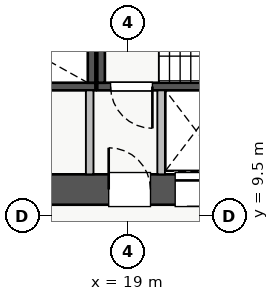
"""IFC4 building model, lengths in metres.
Left out: names, types, materials, properties, quantities, classifications, styles, units other than length and angle.
Written with IfcOpenShell. Run it as: python <this file> out.ifc"""

import sys

from ifc_helpers import new_model, si_unit, direction, frame, frame_2d, origin, place, context, subcontext, project, spatial, rectangle, extrude, source, transform, mapped, element, fill, save


model = new_model("IFC4")
c1 = context("Model", 3, precision=1e-05, world=origin(), true_north=direction((0.0, 1.0)))
c2 = subcontext(c1, "Body", "Model", "MODEL_VIEW")
j1 = project(units=[si_unit("LENGTHUNIT", "METRE"), si_unit("PLANEANGLEUNIT", "RADIAN")], contexts=[c1])
p1 = place(None, origin())
s1 = spatial("IfcSite", under=j1, at=p1, CompositionType="ELEMENT")
p2 = place(p1, origin())
s2 = spatial("IfcBuilding", under=s1, at=p2, CompositionType="ELEMENT")
p3 = place(p2, frame((0.0, 0.0, 82.75)))
s3 = spatial("IfcBuildingStorey", under=s2, at=p3, CompositionType="ELEMENT", Elevation=82.75)
p4 = place(p3, frame((19.88, 12.8, 0.0), z_axis=(0.0, 0.0, 1.0), x_axis=(1.0, 0.0, 0.0)))
e1 = element("IfcWall", 1, at=p4, inside=s3, PredefinedType="SHEAR", context=c2, shape_type="SweptSolid", body=[
    extrude(rectangle(XDim=1.87, YDim=0.18, at=frame_2d((0.935, 0.0))), origin(), (0.0, 0.0, 1.0), 3.07),
])
p5 = place(p3, frame((11.0, 12.91, 0.0), z_axis=(0.0, 0.0, 1.0), x_axis=(1.0, 0.0, 0.0)))
e2 = element("IfcWall", 2, at=p5, inside=s3, PredefinedType="SHEAR", context=c2, shape_type="SweptSolid", body=[
    extrude(rectangle(XDim=7.15, YDim=0.2, at=frame_2d((3.575, 0.0))), origin(), (0.0, 0.0, 1.0), 3.25),
])
p6 = place(p5, frame((0.35, 0.0, 0.0)))
e3 = element("IfcOpeningElement", 3, at=p6, cuts=e2, PredefinedType="OPENING", context=c2, shape_type="SweptSolid", body=[
    extrude(rectangle(XDim=1.1, YDim=2.05, at=frame_2d((0.55, 1.025))), frame((0.0, 0.11, 0.0), z_axis=(0.0, -1.0, 0.0), x_axis=(1.0, 0.0, 0.0)), (0.0, 0.0, 1.0), 0.22),
])
p7 = place(p3, frame((18.05, 13.01, 0.0), z_axis=(0.0, 0.0, 1.0), x_axis=(0.0, 1.0, 0.0)))
e4 = element("IfcWall", 4, at=p7, inside=s3, PredefinedType="SHEAR", context=c2, shape_type="SweptSolid", body=[
    extrude(rectangle(XDim=2.94, YDim=0.2, at=frame_2d((1.47, 0.0))), origin(), (0.0, 0.0, 1.0), 3.25),
])
p8 = place(p3, frame((18.2, 12.91, 0.0), z_axis=(0.0, 0.0, 1.0), x_axis=(1.0, 0.0, 0.0)))
e5 = element("IfcWall", 5, at=p8, inside=s3, PredefinedType="SHEAR", context=c2, shape_type="SweptSolid", body=[
    extrude(rectangle(XDim=7.15, YDim=0.2, at=frame_2d((3.575, 0.0))), origin(), (0.0, 0.0, 1.0), 3.25),
])
p9 = place(p8, frame((0.35, 0.0, 0.0)))
e6 = element("IfcOpeningElement", 6, at=p9, cuts=e5, PredefinedType="OPENING", context=c2, shape_type="SweptSolid", body=[
    extrude(rectangle(XDim=1.1, YDim=2.05, at=frame_2d((0.55, 1.025))), frame((0.0, 0.11, 0.0), z_axis=(0.0, -1.0, 0.0), x_axis=(1.0, 0.0, 0.0)), (0.0, 0.0, 1.0), 0.22),
])
p10 = place(p3, frame((18.3, 13.01, 0.0), z_axis=(0.0, 0.0, 1.0), x_axis=(0.0, 1.0, 0.0)))
e7 = element("IfcWall", 7, at=p10, inside=s3, PredefinedType="SHEAR", context=c2, shape_type="SweptSolid", body=[
    extrude(rectangle(XDim=2.94, YDim=0.2, at=frame_2d((1.47, 0.0))), origin(), (0.0, 0.0, 1.0), 3.25),
])
p11 = place(p3, frame((10.2, 10.2, 0.0), z_axis=(0.0, 0.0, 1.0), x_axis=(1.0, 0.0, 0.0)))
e8 = element("IfcWall", 8, at=p11, inside=s3, PredefinedType="SHEAR", context=c2, shape_type="SweptSolid", body=[
    extrude(rectangle(XDim=17.6, YDim=0.8, at=frame_2d((8.8, 0.0))), origin(), (0.0, 0.0, 1.0), 3.25),
])
p12 = place(p11, frame((1.15, 0.0, 0.0)))
e9 = element("IfcOpeningElement", 9, at=p12, cuts=e8, PredefinedType="OPENING", context=c2, shape_type="SweptSolid", body=[
    extrude(rectangle(XDim=1.1, YDim=2.05, at=frame_2d((0.55, 1.025))), frame((0.0, 0.41, 0.0), z_axis=(0.0, -1.0, 0.0), x_axis=(1.0, 0.0, 0.0)), (0.0, 0.0, 1.0), 0.82),
])
p13 = place(p11, frame((8.3, 0.0, 0.0)))
e10 = element("IfcOpeningElement", 10, at=p13, cuts=e8, PredefinedType="OPENING", context=c2, shape_type="SweptSolid", body=[
    extrude(rectangle(XDim=1.1, YDim=2.05, at=frame_2d((0.55, 1.025))), frame((0.0, 0.41, 0.0), z_axis=(0.0, -1.0, 0.0), x_axis=(1.0, 0.0, 0.0)), (0.0, 0.0, 1.0), 0.82),
])
p14 = place(p11, frame((10.05, 0.0, 0.0)))
e11 = element("IfcOpeningElement", 11, at=p14, cuts=e8, PredefinedType="OPENING", context=c2, shape_type="SweptSolid", body=[
    extrude(rectangle(XDim=1.1, YDim=2.05, at=frame_2d((0.55, 1.025))), frame((0.0, 0.41, 0.0), z_axis=(0.0, -1.0, 0.0), x_axis=(1.0, 0.0, 0.0)), (0.0, 0.0, 1.0), 0.82),
])
p15 = place(p11, frame((14.74, 0.0, 0.0)))
e12 = element("IfcOpeningElement", 12, at=p15, cuts=e8, PredefinedType="OPENING", context=c2, shape_type="SweptSolid", body=[
    extrude(rectangle(XDim=1.0, YDim=2.05, at=frame_2d((0.5, 1.025))), frame((0.0, 0.41, 0.0), z_axis=(0.0, -1.0, 0.0), x_axis=(1.0, 0.0, 0.0)), (0.0, 0.0, 1.0), 0.82),
])
p16 = place(p11, frame((11.835, 0.0, 0.0)))
e13 = element("IfcOpeningElement", 13, at=p16, cuts=e8, PredefinedType="OPENING", context=c2, shape_type="SweptSolid", body=[
    extrude(rectangle(XDim=1.0, YDim=2.05, at=frame_2d((0.5, 1.025))), frame((0.0, 0.41, 0.0), z_axis=(0.0, -1.0, 0.0), x_axis=(1.0, 0.0, 0.0)), (0.0, 0.0, 1.0), 0.82),
])
p17 = place(p11, frame((13.37, 0.0, 0.0)))
e14 = element("IfcOpeningElement", 14, at=p17, cuts=e8, PredefinedType="OPENING", context=c2, shape_type="SweptSolid", body=[
    extrude(rectangle(XDim=1.0, YDim=2.05, at=frame_2d((0.5, 1.025))), frame((0.0, 0.41, 0.0), z_axis=(0.0, -1.0, 0.0), x_axis=(1.0, 0.0, 0.0)), (0.0, 0.0, 1.0), 0.82),
])
for number, where, z_axis, x_axis in (
    (15, (18.0, 10.6, 0.0), (0.0, 0.0, 1.0), (0.0, 1.0, 0.0)),
    (16, (19.88, 10.6, 0.0), (0.0, 0.0, 1.0), (0.0, 1.0, 0.0)),
):
    element("IfcWall", number, at=place(p3, frame(where, z_axis=z_axis, x_axis=x_axis)), inside=s3, PredefinedType="PARTITIONING", context=c2, shape_type="SweptSolid", body=[
        extrude(rectangle(XDim=2.21, YDim=0.2, at=frame_2d((1.105, 0.0))), origin(), (0.0, 0.0, 1.0), 3.07),
    ])
m1 = source(origin(), c2, "Body", "SweptSolid", [
    extrude(rectangle(XDim=1.1, YDim=2.05, at=frame_2d((0.55, 1.025))), frame((0.0, 0.025, 0.0), z_axis=(0.0, -1.0, 0.0), x_axis=(1.0, 0.0, 0.0)), (0.0, 0.0, 1.0), 0.05),
])
p18 = place(p13, origin())
e17 = element("IfcDoor", 17, at=p18, inside=s3, OperationType="SINGLE_SWING_LEFT", PredefinedType="DOOR", context=c2, shape_type="MappedRepresentation", body=[
    mapped(m1, transform((0.0, 0.0, 0.0), x_axis=(1.0, 0.0, 0.0), y_axis=(0.0, 1.0, 0.0), z_axis=(0.0, 0.0, 1.0), scale=1.0)),
])
fill(e10, e17)
p19 = place(p9, frame((1.1, 0.0, 0.0), z_axis=(0.0, 0.0, 1.0), x_axis=(-1.0, 0.0, 0.0)))
e18 = element("IfcDoor", 18, at=p19, inside=s3, OperationType="SINGLE_SWING_RIGHT", PredefinedType="DOOR", context=c2, shape_type="MappedRepresentation", body=[
    mapped(m1, transform((0.0, 0.0, 0.0), x_axis=(1.0, 0.0, 0.0), y_axis=(0.0, 1.0, 0.0), z_axis=(0.0, 0.0, 1.0), scale=1.0)),
])
fill(e6, e18)
p20 = place(p14, origin())
e19 = element("IfcDoor", 19, at=p20, inside=s3, OperationType="SLIDING_TO_RIGHT", PredefinedType="DOOR", context=c2, shape_type="MappedRepresentation", body=[
    mapped(m1, transform((0.0, 0.0, 0.0), x_axis=(1.0, 0.0, 0.0), y_axis=(0.0, 1.0, 0.0), z_axis=(0.0, 0.0, 1.0), scale=1.0)),
])
fill(e11, e19)
save(model, sys.argv[1])
